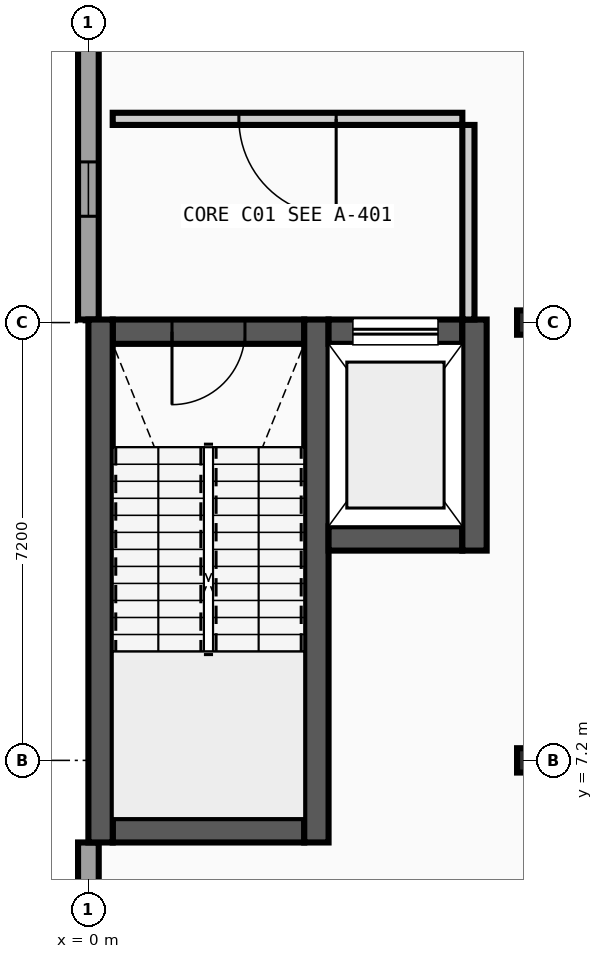
"""IFC4 building model, lengths in metres.
Left out: names, types, materials, properties, quantities, classifications, styles, units other than length and angle.
Written with IfcOpenShell. Run it as: python <this file> out.ifc"""

import sys

from ifc_helpers import new_model, si_unit, direction, frame, frame_2d, origin, origin_2d, place, context, subcontext, project, spatial, rectangle, i_section, extrude, element, fill, save


model = new_model("IFC4")
c1 = context("Model", 3, precision=1e-05, world=origin(), true_north=direction((0.0, 1.0)))
c2 = subcontext(c1, "Body", "Model", "MODEL_VIEW")
j1 = project(units=[si_unit("LENGTHUNIT", "METRE"), si_unit("PLANEANGLEUNIT", "RADIAN")], contexts=[c1])
p1 = place(None, origin())
s1 = spatial("IfcSite", under=j1, at=p1, CompositionType="ELEMENT")
p2 = place(p1, origin())
s2 = spatial("IfcBuilding", under=s1, at=p2, CompositionType="ELEMENT")
p3 = place(p2, frame((0.0, 0.0, 14.0)))
s3 = spatial("IfcBuildingStorey", under=s2, at=p3, CompositionType="ELEMENT", Elevation=14.0)
for number, where, z_axis, x_axis in (
    (1, (7.2, 7.2, 0.0), (0.0, 0.0, 1.0), (1.0, 0.0, 0.0)),
    (2, (7.2, 14.4, 0.0), (0.0, 0.0, 1.0), (1.0, 0.0, 0.0)),
):
    element("IfcColumn", number, at=place(p3, frame(where, z_axis=z_axis, x_axis=x_axis)), inside=s3, PredefinedType="COLUMN", context=c2, shape_type="SweptSolid", body=[
        extrude(i_section(OverallWidth=0.3, OverallDepth=0.4, WebThickness=0.013, FlangeThickness=0.024, FilletRadius=0.027, at=origin_2d()), origin(), (0.0, 0.0, 1.0), 4.4),
    ])
p4 = place(p3, frame((0.0, 5.85, 0.0), z_axis=(0.0, 0.0, 1.0), x_axis=(0.0, -1.0, 0.0)))
e3 = element("IfcWall", 3, at=p4, inside=s3, PredefinedType="STANDARD", context=c2, shape_type="SweptSolid", body=[
    extrude(rectangle(XDim=5.68, YDim=0.34, at=frame_2d((2.84, 0.0))), origin(), (0.0, 0.0, 1.0), 4.2),
])
p5 = place(p4, frame((2.41, 0.0, 0.95)))
e4 = element("IfcOpeningElement", 4, at=p5, cuts=e3, PredefinedType="OPENING", context=c2, shape_type="SweptSolid", body=[
    extrude(rectangle(XDim=0.86, YDim=1.368, at=frame_2d((0.43, 0.684))), frame((0.0, 0.18, 0.0), z_axis=(0.0, -1.0, 0.0), x_axis=(1.0, 0.0, 0.0)), (0.0, 0.0, 1.0), 0.36),
])
p6 = place(p3, frame((0.0, 21.6, 0.0), z_axis=(0.0, 0.0, 1.0), x_axis=(0.0, -1.0, 0.0)))
e5 = element("IfcWall", 5, at=p6, inside=s3, PredefinedType="STANDARD", context=c2, shape_type="SweptSolid", body=[
    extrude(rectangle(XDim=7.15, YDim=0.34, at=frame_2d((3.575, 0.0))), origin(), (0.0, 0.0, 1.0), 4.2),
])
p7 = place(p6, frame((1.698, 0.0, 0.95)))
e6 = element("IfcOpeningElement", 6, at=p7, cuts=e5, PredefinedType="OPENING", context=c2, shape_type="SweptSolid", body=[
    extrude(rectangle(XDim=0.894, YDim=1.368, at=frame_2d((0.447, 0.684))), frame((0.0, 0.18, 0.0), z_axis=(0.0, -1.0, 0.0), x_axis=(1.0, 0.0, 0.0)), (0.0, 0.0, 1.0), 0.36),
])
p8 = place(p6, frame((4.558, 0.0, 0.95)))
e7 = element("IfcOpeningElement", 7, at=p8, cuts=e5, PredefinedType="OPENING", context=c2, shape_type="SweptSolid", body=[
    extrude(rectangle(XDim=0.894, YDim=1.368, at=frame_2d((0.447, 0.684))), frame((0.0, 0.18, 0.0), z_axis=(0.0, -1.0, 0.0), x_axis=(1.0, 0.0, 0.0)), (0.0, 0.0, 1.0), 0.36),
])
p9 = place(p3, frame((0.4, 6.05, 0.0), z_axis=(0.0, 0.0, 1.0), x_axis=(1.0, 0.0, 0.0)))
e8 = element("IfcWall", 8, at=p9, inside=s3, PredefinedType="SHEAR", context=c2, shape_type="SweptSolid", body=[
    extrude(rectangle(XDim=3.15, YDim=0.4, at=frame_2d((1.575, 0.0))), origin(), (0.0, 0.0, 1.0), 4.2),
])
p10 = place(p3, frame((0.4, 14.25, 0.0), z_axis=(0.0, 0.0, 1.0), x_axis=(1.0, 0.0, 0.0)))
e9 = element("IfcWall", 9, at=p10, inside=s3, PredefinedType="SHEAR", context=c2, shape_type="SweptSolid", body=[
    extrude(rectangle(XDim=3.15, YDim=0.4, at=frame_2d((1.575, 0.0))), origin(), (0.0, 0.0, 1.0), 4.2),
])
p11 = place(p10, frame((0.975, 0.0, 0.0)))
e10 = element("IfcOpeningElement", 10, at=p11, cuts=e9, PredefinedType="OPENING", context=c2, shape_type="SweptSolid", body=[
    extrude(rectangle(XDim=1.2, YDim=2.15, at=frame_2d((0.6, 1.075))), frame((0.0, 0.21, 0.0), z_axis=(0.0, -1.0, 0.0), x_axis=(1.0, 0.0, 0.0)), (0.0, 0.0, 1.0), 0.42),
])
for number, where, z_axis, x_axis in (
    (11, (0.2, 5.85, 0.0), (0.0, 0.0, 1.0), (0.0, 1.0, 0.0)),
    (12, (3.75, 5.85, 0.0), (0.0, 0.0, 1.0), (0.0, 1.0, 0.0)),
):
    element("IfcWall", number, at=place(p3, frame(where, z_axis=z_axis, x_axis=x_axis)), inside=s3, PredefinedType="SHEAR", context=c2, shape_type="SweptSolid", body=[
        extrude(rectangle(XDim=8.6, YDim=0.4, at=frame_2d((4.3, 0.0))), origin(), (0.0, 0.0, 1.0), 4.2),
    ])
p12 = place(p3, frame((3.95, 10.85, 0.0), z_axis=(0.0, 0.0, 1.0), x_axis=(1.0, 0.0, 0.0)))
e13 = element("IfcWall", 13, at=p12, inside=s3, PredefinedType="SHEAR", context=c2, shape_type="SweptSolid", body=[
    extrude(rectangle(XDim=2.2, YDim=0.4, at=frame_2d((1.1, 0.0))), origin(), (0.0, 0.0, 1.0), 4.2),
])
p13 = place(p3, frame((3.95, 14.25, 0.0), z_axis=(0.0, 0.0, 1.0), x_axis=(1.0, 0.0, 0.0)))
e14 = element("IfcWall", 14, at=p13, inside=s3, PredefinedType="SHEAR", context=c2, shape_type="SweptSolid", body=[
    extrude(rectangle(XDim=2.2, YDim=0.4, at=frame_2d((1.1, 0.0))), origin(), (0.0, 0.0, 1.0), 4.2),
])
p14 = place(p13, frame((0.4, 0.0, 0.0)))
e15 = element("IfcOpeningElement", 15, at=p14, cuts=e14, PredefinedType="OPENING", context=c2, shape_type="SweptSolid", body=[
    extrude(rectangle(XDim=1.4, YDim=2.2, at=frame_2d((0.7, 1.1))), frame((0.0, 0.21, 0.0), z_axis=(0.0, -1.0, 0.0), x_axis=(1.0, 0.0, 0.0)), (0.0, 0.0, 1.0), 0.42),
])
p15 = place(p3, frame((6.35, 10.65, 0.0), z_axis=(0.0, 0.0, 1.0), x_axis=(0.0, 1.0, 0.0)))
e16 = element("IfcWall", 16, at=p15, inside=s3, PredefinedType="SHEAR", context=c2, shape_type="SweptSolid", body=[
    extrude(rectangle(XDim=3.8, YDim=0.4, at=frame_2d((1.9, 0.0))), origin(), (0.0, 0.0, 1.0), 4.2),
])
p16 = place(p3, frame((0.4, 17.75, 0.0), z_axis=(0.0, 0.0, 1.0), x_axis=(1.0, 0.0, 0.0)))
e17 = element("IfcWall", 17, at=p16, inside=s3, PredefinedType="PARTITIONING", context=c2, shape_type="SweptSolid", body=[
    extrude(rectangle(XDim=5.75, YDim=0.2, at=frame_2d((2.875, 0.0))), origin(), (0.0, 0.0, 1.0), 4.2),
])
p17 = place(p16, frame((2.075, 0.0, 0.0)))
e18 = element("IfcOpeningElement", 18, at=p17, cuts=e17, PredefinedType="OPENING", context=c2, shape_type="SweptSolid", body=[
    extrude(rectangle(XDim=1.6, YDim=2.2, at=frame_2d((0.8, 1.1))), frame((0.0, 0.11, 0.0), z_axis=(0.0, -1.0, 0.0), x_axis=(1.0, 0.0, 0.0)), (0.0, 0.0, 1.0), 0.22),
])
p18 = place(p3, frame((6.25, 14.45, 0.0), z_axis=(0.0, 0.0, 1.0), x_axis=(0.0, 1.0, 0.0)))
e19 = element("IfcWall", 19, at=p18, inside=s3, PredefinedType="PARTITIONING", context=c2, shape_type="SweptSolid", body=[
    extrude(rectangle(XDim=3.2, YDim=0.2, at=frame_2d((1.6, 0.0))), origin(), (0.0, 0.0, 1.0), 4.2),
])
p19 = place(p8, origin())
e20 = element("IfcWindow", 20, at=p19, inside=s3, PartitioningType="SINGLE_PANEL", PredefinedType="WINDOW", context=c2, shape_type="SweptSolid", body=[
    extrude(rectangle(XDim=0.894, YDim=1.368, at=frame_2d((0.447, 0.684))), frame((0.0, 0.03, 0.0), z_axis=(0.0, -1.0, 0.0), x_axis=(1.0, 0.0, 0.0)), (0.0, 0.0, 1.0), 0.06),
])
fill(e7, e20)
p20 = place(p11, frame((1.2, 0.0, 0.0), z_axis=(0.0, 0.0, 1.0), x_axis=(-1.0, 0.0, 0.0)))
e21 = element("IfcDoor", 21, at=p20, inside=s3, OperationType="SINGLE_SWING_LEFT", PredefinedType="DOOR", context=c2, shape_type="SweptSolid", body=[
    extrude(rectangle(XDim=1.2, YDim=2.15, at=frame_2d((0.6, 1.075))), frame((0.0, 0.025, 0.0), z_axis=(0.0, -1.0, 0.0), x_axis=(1.0, 0.0, 0.0)), (0.0, 0.0, 1.0), 0.05),
])
fill(e10, e21)
p21 = place(p14, origin())
e22 = element("IfcDoor", 22, at=p21, inside=s3, OperationType="SLIDING_TO_LEFT", PredefinedType="DOOR", context=c2, shape_type="SweptSolid", body=[
    extrude(rectangle(XDim=1.4, YDim=2.2, at=frame_2d((0.7, 1.1))), frame((0.0, 0.025, 0.0), z_axis=(0.0, -1.0, 0.0), x_axis=(1.0, 0.0, 0.0)), (0.0, 0.0, 1.0), 0.05),
])
fill(e15, e22)
p22 = place(p17, origin())
e23 = element("IfcDoor", 23, at=p22, inside=s3, OperationType="DOUBLE_DOOR_SINGLE_SWING", PredefinedType="DOOR", context=c2, shape_type="SweptSolid", body=[
    extrude(rectangle(XDim=1.6, YDim=2.2, at=frame_2d((0.8, 1.1))), frame((0.0, 0.025, 0.0), z_axis=(0.0, -1.0, 0.0), x_axis=(1.0, 0.0, 0.0)), (0.0, 0.0, 1.0), 0.05),
])
fill(e18, e23)
save(model, sys.argv[1])
